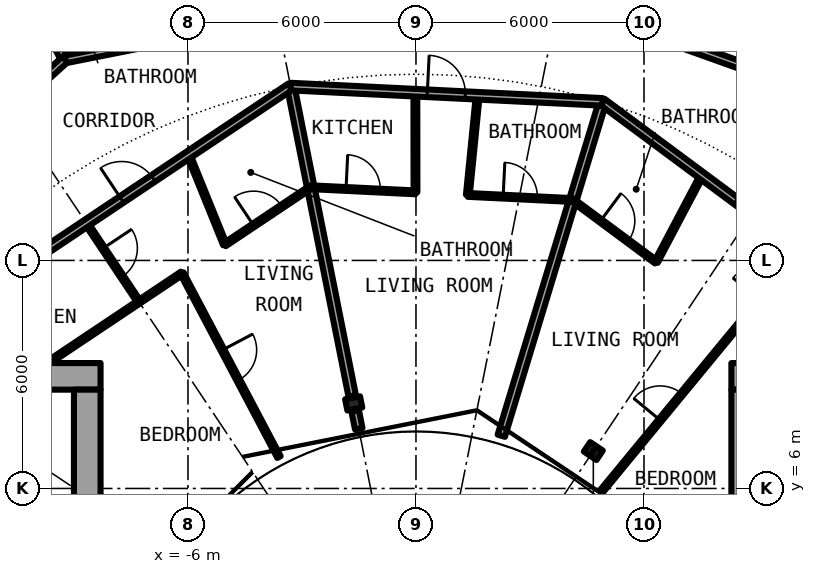
"""IFC4 building model, lengths in metres.
Left out: names, types, materials, properties, quantities, classifications, styles, units other than length and angle.
Written with IfcOpenShell. Run it as: python <this file> out.ifc"""

import sys

from ifc_helpers import new_model, si_unit, direction, frame, frame_2d, origin, origin_2d, place, context, subcontext, project, spatial, rectangle, i_section, extrude, element, fill, save


model = new_model("IFC4")
c1 = context("Model", 3, precision=1e-05, world=origin(), true_north=direction((0.0, 1.0)))
c2 = subcontext(c1, "Body", "Model", "MODEL_VIEW")
j1 = project(units=[si_unit("LENGTHUNIT", "METRE"), si_unit("PLANEANGLEUNIT", "RADIAN")], contexts=[c1])
p1 = place(None, origin())
s1 = spatial("IfcSite", under=j1, at=p1, CompositionType="ELEMENT")
p2 = place(p1, origin())
s2 = spatial("IfcBuilding", under=s1, at=p2, CompositionType="ELEMENT")
p3 = place(p2, frame((0.0, 0.0, 63.6)))
s3 = spatial("IfcBuildingStorey", under=s2, at=p3, CompositionType="ELEMENT", Elevation=63.6)
for number, where, z_axis, x_axis in (
    (1, (4.667, 6.984, 0.0), (0.0, 0.0, 1.0), (0.556, 0.831, 0.0)),
    (2, (-1.639, 8.239, 0.0), (0.0, 0.0, 1.0), (-0.195, 0.981, 0.0)),
):
    element("IfcColumn", number, at=place(p3, frame(where, z_axis=z_axis, x_axis=x_axis)), inside=s3, PredefinedType="COLUMN", context=c2, shape_type="SweptSolid", body=[
        extrude(i_section(OverallWidth=0.3, OverallDepth=0.4, WebThickness=0.013, FlangeThickness=0.024, FilletRadius=0.027, at=origin_2d()), origin(), (0.0, 0.0, 1.0), 3.05),
    ])
p4 = place(p3, frame((22.3, 8.95, 0.0), z_axis=(0.0, 0.0, 1.0), x_axis=(-1.0, 0.0, 0.0)))
e3 = element("IfcWall", 3, at=p4, inside=s3, PredefinedType="SHEAR", context=c2, shape_type="SweptSolid", body=[
    extrude(rectangle(XDim=14.0, YDim=0.7, at=frame_2d((7.0, 0.0))), origin(), (0.0, 0.0, 1.0), 3.05),
])
p5 = place(p4, frame((1.225, 0.0, 0.0)))
e4 = element("IfcOpeningElement", 4, at=p5, cuts=e3, PredefinedType="OPENING", context=c2, shape_type="SweptSolid", body=[
    extrude(rectangle(XDim=1.2, YDim=2.3, at=frame_2d((0.6, 1.15))), frame((0.0, 0.36, 0.0), z_axis=(0.0, -1.0, 0.0), x_axis=(1.0, 0.0, 0.0)), (0.0, 0.0, 1.0), 0.72),
])
p6 = place(p3, frame((8.65, -8.6, 0.0), z_axis=(0.0, 0.0, 1.0), x_axis=(0.0, 1.0, 0.0)))
e5 = element("IfcWall", 5, at=p6, inside=s3, PredefinedType="SHEAR", context=c2, shape_type="SweptSolid", body=[
    extrude(rectangle(XDim=17.2, YDim=0.7, at=frame_2d((8.6, 0.0))), origin(), (0.0, 0.0, 1.0), 3.05),
])
p7 = place(p6, frame((7.4, 0.0, 0.1)))
e6 = element("IfcOpeningElement", 6, at=p7, cuts=e5, PredefinedType="OPENING", context=c2, shape_type="SweptSolid", body=[
    extrude(rectangle(XDim=2.4, YDim=2.2, at=frame_2d((1.2, 1.1))), frame((0.0, 0.36, 0.0), z_axis=(0.0, -1.0, 0.0), x_axis=(1.0, 0.0, 0.0)), (0.0, 0.0, 1.0), 0.72),
])
p8 = place(p3, frame((-8.3, 8.95, 0.0), z_axis=(0.0, 0.0, 1.0), x_axis=(-1.0, 0.0, 0.0)))
e7 = element("IfcWall", 7, at=p8, inside=s3, PredefinedType="SHEAR", context=c2, shape_type="SweptSolid", body=[
    extrude(rectangle(XDim=14.0, YDim=0.7, at=frame_2d((7.0, 0.0))), origin(), (0.0, 0.0, 1.0), 3.05),
])
p9 = place(p8, frame((11.575, 0.0, 0.0)))
e8 = element("IfcOpeningElement", 8, at=p9, cuts=e7, PredefinedType="OPENING", context=c2, shape_type="SweptSolid", body=[
    extrude(rectangle(XDim=1.2, YDim=2.3, at=frame_2d((0.6, 1.15))), frame((0.0, 0.36, 0.0), z_axis=(0.0, -1.0, 0.0), x_axis=(1.0, 0.0, 0.0)), (0.0, 0.0, 1.0), 0.72),
])
p10 = place(p3, frame((-8.65, 8.6, 0.0), z_axis=(0.0, 0.0, 1.0), x_axis=(0.0, -1.0, 0.0)))
e9 = element("IfcWall", 9, at=p10, inside=s3, PredefinedType="SHEAR", context=c2, shape_type="SweptSolid", body=[
    extrude(rectangle(XDim=17.2, YDim=0.7, at=frame_2d((8.6, 0.0))), origin(), (0.0, 0.0, 1.0), 3.05),
])
p11 = place(p10, frame((7.4, 0.0, 0.1)))
e10 = element("IfcOpeningElement", 10, at=p11, cuts=e9, PredefinedType="OPENING", context=c2, shape_type="SweptSolid", body=[
    extrude(rectangle(XDim=2.4, YDim=2.2, at=frame_2d((1.2, 1.1))), frame((0.0, 0.36, 0.0), z_axis=(0.0, -1.0, 0.0), x_axis=(1.0, 0.0, 0.0)), (0.0, 0.0, 1.0), 0.72),
])
p12 = place(p3, frame((-12.81, 23.966, 0.0), z_axis=(0.0, 0.0, 1.0), x_axis=(0.471439510802, -0.881898399848, 0.0)))
e11 = element("IfcWall", 11, at=p12, inside=s3, PredefinedType="PARTITIONING", context=c2, shape_type="SweptSolid", body=[
    extrude(rectangle(XDim=7.575, YDim=0.2, at=frame_2d((3.787, 0.0))), origin(), (0.0, 0.0, 1.0), 2.7),
])
p13 = place(p3, frame((-8.674, 12.982, 0.0), z_axis=(0.0, 0.0, 1.0), x_axis=(0.555355163998, -0.831613276602, 0.0)))
e12 = element("IfcWall", 12, at=p13, inside=s3, PredefinedType="PARTITIONING", context=c2, shape_type="SweptSolid", body=[
    extrude(rectangle(XDim=2.494, YDim=0.1, at=frame_2d((1.247, 0.0))), origin(), (0.0, 0.0, 1.0), 2.7),
])
p14 = place(p13, frame((0.797, 0.0, 0.0)))
e13 = element("IfcOpeningElement", 13, at=p14, cuts=e12, PredefinedType="OPENING", context=c2, shape_type="SweptSolid", body=[
    extrude(rectangle(XDim=0.9, YDim=2.3, at=frame_2d((0.45, 1.15))), frame((0.0, 0.06, 0.0), z_axis=(0.0, -1.0, 0.0), x_axis=(1.0, 0.0, 0.0)), (0.0, 0.0, 1.0), 0.12),
])
p15 = place(p3, frame((-6.159, 11.663, 0.0), z_axis=(0.0, 0.0, 1.0), x_axis=(0.466976820365, -0.884269556889, 0.0)))
e14 = element("IfcWall", 14, at=p15, inside=s3, PredefinedType="PARTITIONING", context=c2, shape_type="SweptSolid", body=[
    extrude(rectangle(XDim=5.469, YDim=0.1, at=frame_2d((2.735, 0.0))), origin(), (0.0, 0.0, 1.0), 2.7),
])
p16 = place(p15, frame((2.284, 0.0, 0.0)))
e15 = element("IfcOpeningElement", 15, at=p16, cuts=e14, PredefinedType="OPENING", context=c2, shape_type="SweptSolid", body=[
    extrude(rectangle(XDim=0.9, YDim=2.3, at=frame_2d((0.45, 1.15))), frame((0.0, 0.06, 0.0), z_axis=(0.0, -1.0, 0.0), x_axis=(1.0, 0.0, 0.0)), (0.0, 0.0, 1.0), 0.12),
])
p17 = place(p3, frame((-5.986, 14.779, 0.0), z_axis=(0.0, 0.0, 1.0), x_axis=(0.375649498413, -0.926761811008, 0.0)))
e16 = element("IfcWall", 16, at=p17, inside=s3, PredefinedType="PARTITIONING", context=c2, shape_type="SweptSolid", body=[
    extrude(rectangle(XDim=2.548, YDim=0.1, at=frame_2d((1.274, 0.0))), origin(), (0.0, 0.0, 1.0), 2.7),
])
p18 = place(p3, frame((-3.297, 16.575, 0.0), z_axis=(0.0, 0.0, 1.0), x_axis=(0.195092097924, -0.980784927152, 0.0)))
e17 = element("IfcWall", 17, at=p18, inside=s3, PredefinedType="PARTITIONING", context=c2, shape_type="SweptSolid", body=[
    extrude(rectangle(XDim=8.299, YDim=0.2, at=frame_2d((4.15, 0.0))), origin(), (0.0, 0.0, 1.0), 2.7),
])
p19 = place(p3, frame((-1.6, 8.042, 0.0), z_axis=(0.0, 0.0, 1.0), x_axis=(0.196116135138, -0.980580675691, 0.0)))
e18 = element("IfcWall", 18, at=p19, inside=s3, PredefinedType="PARTITIONING", context=c2, shape_type="SweptSolid", body=[
    extrude(rectangle(XDim=0.479, YDim=0.2, at=frame_2d((0.24, 0.0))), origin(), (0.0, 0.0, 1.0), 2.7),
])
p20 = place(p3, frame((-0.013, 13.792, 0.0), z_axis=(0.0, 0.0, 1.0), x_axis=(-0.001210427419, 0.999999267432, 0.0)))
e19 = element("IfcWall", 19, at=p20, inside=s3, PredefinedType="PARTITIONING", context=c2, shape_type="SweptSolid", body=[
    extrude(rectangle(XDim=2.622, YDim=0.1, at=frame_2d((1.311, 0.0))), origin(), (0.0, 0.0, 1.0), 2.7),
])
p21 = place(p3, frame((1.365, 13.724, 0.0), z_axis=(0.0, 0.0, 1.0), x_axis=(0.099171803948, 0.995070325807, 0.0)))
e20 = element("IfcWall", 20, at=p21, inside=s3, PredefinedType="PARTITIONING", context=c2, shape_type="SweptSolid", body=[
    extrude(rectangle(XDim=2.622, YDim=0.1, at=frame_2d((1.311, 0.0))), origin(), (0.0, 0.0, 1.0), 2.7),
])
p22 = place(p3, frame((2.245, 7.387, 0.0), z_axis=(0.0, 0.0, 1.0), x_axis=(0.290403763195, 0.956904203315, 0.0)))
e21 = element("IfcWall", 21, at=p22, inside=s3, PredefinedType="PARTITIONING", context=c2, shape_type="SweptSolid", body=[
    extrude(rectangle(XDim=9.179, YDim=0.2, at=frame_2d((4.59, 0.0))), origin(), (0.0, 0.0, 1.0), 2.7),
])
p23 = place(p3, frame((4.909, 5.958, 0.0), z_axis=(0.0, 0.0, 1.0), x_axis=(0.635976043025, 0.771708800454, 0.0)))
e22 = element("IfcWall", 22, at=p23, inside=s3, PredefinedType="PARTITIONING", context=c2, shape_type="SweptSolid", body=[
    extrude(rectangle(XDim=8.213, YDim=0.1, at=frame_2d((4.106, 0.0))), origin(), (0.0, 0.0, 1.0), 2.7),
])
p24 = place(p23, frame((6.49, 0.0, 0.0)))
e23 = element("IfcOpeningElement", 23, at=p24, cuts=e22, PredefinedType="OPENING", context=c2, shape_type="SweptSolid", body=[
    extrude(rectangle(XDim=0.9, YDim=2.3, at=frame_2d((0.45, 1.15))), frame((0.0, 0.06, 0.0), z_axis=(0.0, -1.0, 0.0), x_axis=(1.0, 0.0, 0.0)), (0.0, 0.0, 1.0), 0.12),
])
p25 = place(p23, frame((2.384, 0.0, 0.0)))
e24 = element("IfcOpeningElement", 24, at=p25, cuts=e22, PredefinedType="OPENING", context=c2, shape_type="SweptSolid", body=[
    extrude(rectangle(XDim=0.9, YDim=2.3, at=frame_2d((0.45, 1.15))), frame((0.0, 0.06, 0.0), z_axis=(0.0, -1.0, 0.0), x_axis=(1.0, 0.0, 0.0)), (0.0, 0.0, 1.0), 0.12),
])
p26 = place(p3, frame((6.318, 11.96, 0.0), z_axis=(0.0, 0.0, 1.0), x_axis=(0.467001992543, 0.884256263173, 0.0)))
e25 = element("IfcWall", 25, at=p26, inside=s3, PredefinedType="PARTITIONING", context=c2, shape_type="SweptSolid", body=[
    extrude(rectangle(XDim=2.572, YDim=0.1, at=frame_2d((1.286, 0.0))), origin(), (0.0, 0.0, 1.0), 2.7),
])
p27 = place(p3, frame((-9.695, 9.3, 0.0), z_axis=(0.0, 0.0, 1.0), x_axis=(0.831369521678, 0.555720000022, 0.0)))
e26 = element("IfcWall", 26, at=p27, inside=s3, PredefinedType="PARTITIONING", context=c2, shape_type="SweptSolid", body=[
    extrude(rectangle(XDim=4.252, YDim=0.1, at=frame_2d((2.126, 0.0))), origin(), (0.0, 0.0, 1.0), 2.7),
])
p28 = place(p3, frame((-5.032, 12.417, 0.0), z_axis=(0.0, 0.0, 1.0), x_axis=(0.831538390496, 0.555467285384, 0.0)))
e27 = element("IfcWall", 27, at=p28, inside=s3, PredefinedType="PARTITIONING", context=c2, shape_type="SweptSolid", body=[
    extrude(rectangle(XDim=2.717, YDim=0.1, at=frame_2d((1.358, 0.0))), origin(), (0.0, 0.0, 1.0), 2.7),
])
p29 = place(p28, frame((0.911, 0.0, 0.0)))
e28 = element("IfcOpeningElement", 28, at=p29, cuts=e27, PredefinedType="OPENING", context=c2, shape_type="SweptSolid", body=[
    extrude(rectangle(XDim=0.9, YDim=2.3, at=frame_2d((0.45, 1.15))), frame((0.0, 0.06, 0.0), z_axis=(0.0, -1.0, 0.0), x_axis=(1.0, 0.0, 0.0)), (0.0, 0.0, 1.0), 0.12),
])
p30 = place(p3, frame((4.122, 13.589, 0.0), z_axis=(0.0, 0.0, 1.0), x_axis=(0.803128348509, -0.595806055542, 0.0)))
e29 = element("IfcWall", 29, at=p30, inside=s3, PredefinedType="PARTITIONING", context=c2, shape_type="SweptSolid", body=[
    extrude(rectangle(XDim=2.734, YDim=0.1, at=frame_2d((1.367, 0.0))), origin(), (0.0, 0.0, 1.0), 2.7),
])
p31 = place(p30, frame((0.917, 0.0, 0.0)))
e30 = element("IfcOpeningElement", 30, at=p31, cuts=e29, PredefinedType="OPENING", context=c2, shape_type="SweptSolid", body=[
    extrude(rectangle(XDim=0.9, YDim=2.3, at=frame_2d((0.45, 1.15))), frame((0.0, 0.06, 0.0), z_axis=(0.0, -1.0, 0.0), x_axis=(1.0, 0.0, 0.0)), (0.0, 0.0, 1.0), 0.12),
])
p32 = place(p3, frame((-2.77, 13.926, 0.0), z_axis=(0.0, 0.0, 1.0), x_axis=(0.99880320044, -0.048909782152, 0.0)))
e31 = element("IfcWall", 31, at=p32, inside=s3, PredefinedType="PARTITIONING", context=c2, shape_type="SweptSolid", body=[
    extrude(rectangle(XDim=2.76, YDim=0.1, at=frame_2d((1.38, 0.0))), origin(), (0.0, 0.0, 1.0), 2.7),
])
p33 = place(p32, frame((0.93, 0.0, 0.0)))
e32 = element("IfcOpeningElement", 32, at=p33, cuts=e31, PredefinedType="OPENING", context=c2, shape_type="SweptSolid", body=[
    extrude(rectangle(XDim=0.9, YDim=2.3, at=frame_2d((0.45, 1.15))), frame((0.0, 0.06, 0.0), z_axis=(0.0, -1.0, 0.0), x_axis=(1.0, 0.0, 0.0)), (0.0, 0.0, 1.0), 0.12),
])
p34 = place(p3, frame((1.365, 13.724, 0.0), z_axis=(0.0, 0.0, 1.0), x_axis=(0.99880320044, -0.048909782152, 0.0)))
e33 = element("IfcWall", 33, at=p34, inside=s3, PredefinedType="PARTITIONING", context=c2, shape_type="SweptSolid", body=[
    extrude(rectangle(XDim=2.76, YDim=0.1, at=frame_2d((1.38, 0.0))), origin(), (0.0, 0.0, 1.0), 2.7),
])
p35 = place(p34, frame((0.93, 0.0, 0.0)))
e34 = element("IfcOpeningElement", 34, at=p35, cuts=e33, PredefinedType="OPENING", context=c2, shape_type="SweptSolid", body=[
    extrude(rectangle(XDim=0.9, YDim=2.3, at=frame_2d((0.45, 1.15))), frame((0.0, 0.06, 0.0), z_axis=(0.0, -1.0, 0.0), x_axis=(1.0, 0.0, 0.0)), (0.0, 0.0, 1.0), 0.12),
])
p36 = place(p3, frame((-12.708, 10.286, 0.0), z_axis=(0.0, 0.0, 1.0), x_axis=(0.831405725802, 0.555665834026, 0.0)))
e35 = element("IfcWall", 35, at=p36, inside=s3, PredefinedType="PARTITIONING", context=c2, shape_type="SweptSolid", body=[
    extrude(rectangle(XDim=11.314, YDim=0.2, at=frame_2d((5.657, 0.0))), origin(), (0.0, 0.0, 1.0), 2.7),
])
p37 = place(p36, frame((5.969, 0.0, 0.0)))
e36 = element("IfcOpeningElement", 36, at=p37, cuts=e35, PredefinedType="OPENING", context=c2, shape_type="SweptSolid", body=[
    extrude(rectangle(XDim=1.0, YDim=2.3, at=frame_2d((0.5, 1.15))), frame((0.0, 0.11, 0.0), z_axis=(0.0, -1.0, 0.0), x_axis=(1.0, 0.0, 0.0)), (0.0, 0.0, 1.0), 0.22),
])
p38 = place(p3, frame((4.906, 16.172, 0.0), z_axis=(0.0, 0.0, 1.0), x_axis=(0.803191461888, -0.595720971219, 0.0)))
e37 = element("IfcWall", 37, at=p38, inside=s3, PredefinedType="PARTITIONING", context=c2, shape_type="SweptSolid", body=[
    extrude(rectangle(XDim=9.76, YDim=0.2, at=frame_2d((4.88, 0.0))), origin(), (0.0, 0.0, 1.0), 2.7),
])
p39 = place(p38, frame((4.38, 0.0, 0.0)))
e38 = element("IfcOpeningElement", 38, at=p39, cuts=e37, PredefinedType="OPENING", context=c2, shape_type="SweptSolid", body=[
    extrude(rectangle(XDim=1.0, YDim=2.3, at=frame_2d((0.5, 1.15))), frame((0.0, 0.11, 0.0), z_axis=(0.0, -1.0, 0.0), x_axis=(1.0, 0.0, 0.0)), (0.0, 0.0, 1.0), 0.22),
])
p40 = place(p3, frame((-3.298, 16.574, 0.0), z_axis=(0.0, 0.0, 1.0), x_axis=(0.998802523271, -0.048923608895, 0.0)))
e39 = element("IfcWall", 39, at=p40, inside=s3, PredefinedType="PARTITIONING", context=c2, shape_type="SweptSolid", body=[
    extrude(rectangle(XDim=8.214, YDim=0.2, at=frame_2d((4.107, 0.0))), origin(), (0.0, 0.0, 1.0), 2.7),
])
p41 = place(p40, frame((3.6, 0.0, 0.0)))
e40 = element("IfcOpeningElement", 40, at=p41, cuts=e39, PredefinedType="OPENING", context=c2, shape_type="SweptSolid", body=[
    extrude(rectangle(XDim=1.0, YDim=2.3, at=frame_2d((0.5, 1.15))), frame((0.0, 0.11, 0.0), z_axis=(0.0, -1.0, 0.0), x_axis=(1.0, 0.0, 0.0)), (0.0, 0.0, 1.0), 0.22),
])
p42 = place(p3, frame((-9.239, 17.286, 0.0), z_axis=(0.0, 0.0, 1.0), x_axis=(0.98077905287, 0.195121627328, 0.0)))
e41 = element("IfcWall", 41, at=p42, inside=s3, PredefinedType="PARTITIONING", context=c2, shape_type="SweptSolid", body=[
    extrude(rectangle(XDim=11.379, YDim=0.2, at=frame_2d((5.689, 0.0))), origin(), (0.0, 0.0, 1.0), 2.38),
])
p43 = place(p42, frame((4.241, 0.0, 0.0)))
e42 = element("IfcOpeningElement", 42, at=p43, cuts=e41, PredefinedType="OPENING", context=c2, shape_type="SweptSolid", body=[
    extrude(rectangle(XDim=1.0, YDim=2.3, at=frame_2d((0.5, 1.15))), frame((0.0, 0.11, 0.0), z_axis=(0.0, -1.0, 0.0), x_axis=(1.0, 0.0, 0.0)), (0.0, 0.0, 1.0), 0.22),
])
p44 = place(p3, frame((-16.18, 10.995, 0.0), z_axis=(0.0, 0.0, 1.0), x_axis=(0.741086986457, 0.671409024741, 0.0)))
e43 = element("IfcWall", 43, at=p44, inside=s3, PredefinedType="PARTITIONING", context=c2, shape_type="SweptSolid", body=[
    extrude(rectangle(XDim=9.373, YDim=0.2, at=frame_2d((4.687, 0.0))), origin(), (0.0, 0.0, 1.0), 2.38),
])
p45 = place(p44, frame((4.115, 0.0, 0.0)))
e44 = element("IfcOpeningElement", 44, at=p45, cuts=e43, PredefinedType="OPENING", context=c2, shape_type="SweptSolid", body=[
    extrude(rectangle(XDim=1.0, YDim=2.3, at=frame_2d((0.5, 1.15))), frame((0.0, 0.11, 0.0), z_axis=(0.0, -1.0, 0.0), x_axis=(1.0, 0.0, 0.0)), (0.0, 0.0, 1.0), 0.22),
])
p46 = place(p3, frame((1.924, 19.505, 0.0), z_axis=(0.0, 0.0, 1.0), x_axis=(0.941497449807, -0.337020106237, 0.0)))
e45 = element("IfcWall", 45, at=p46, inside=s3, PredefinedType="PARTITIONING", context=c2, shape_type="SweptSolid", body=[
    extrude(rectangle(XDim=9.364, YDim=0.2, at=frame_2d((4.682, 0.0))), origin(), (0.0, 0.0, 1.0), 2.38),
])
p47 = place(p46, frame((4.259, 0.0, 0.0)))
e46 = element("IfcOpeningElement", 46, at=p47, cuts=e45, PredefinedType="OPENING", context=c2, shape_type="SweptSolid", body=[
    extrude(rectangle(XDim=1.0, YDim=2.3, at=frame_2d((0.5, 1.15))), frame((0.0, 0.11, 0.0), z_axis=(0.0, -1.0, 0.0), x_axis=(1.0, 0.0, 0.0)), (0.0, 0.0, 1.0), 0.22),
])
p48 = place(p39, origin())
e47 = element("IfcDoor", 47, at=p48, inside=s3, OperationType="SINGLE_SWING_LEFT", PredefinedType="DOOR", context=c2, shape_type="SweptSolid", body=[
    extrude(rectangle(XDim=1.0, YDim=2.3, at=frame_2d((0.5, 1.15))), frame((0.0, 0.025, 0.0), z_axis=(0.0, -1.0, 0.0), x_axis=(1.0, 0.0, 0.0)), (0.0, 0.0, 1.0), 0.05),
])
fill(e38, e47)
p49 = place(p31, origin())
e48 = element("IfcDoor", 48, at=p49, inside=s3, OperationType="SINGLE_SWING_LEFT", PredefinedType="DOOR", context=c2, shape_type="SweptSolid", body=[
    extrude(rectangle(XDim=0.9, YDim=2.3, at=frame_2d((0.45, 1.15))), frame((0.0, 0.025, 0.0), z_axis=(0.0, -1.0, 0.0), x_axis=(1.0, 0.0, 0.0)), (0.0, 0.0, 1.0), 0.05),
])
fill(e30, e48)
p50 = place(p25, origin())
e49 = element("IfcDoor", 49, at=p50, inside=s3, OperationType="SINGLE_SWING_LEFT", PredefinedType="DOOR", context=c2, shape_type="SweptSolid", body=[
    extrude(rectangle(XDim=0.9, YDim=2.3, at=frame_2d((0.45, 1.15))), frame((0.0, 0.025, 0.0), z_axis=(0.0, -1.0, 0.0), x_axis=(1.0, 0.0, 0.0)), (0.0, 0.0, 1.0), 0.05),
])
fill(e24, e49)
p51 = place(p41, origin())
e50 = element("IfcDoor", 50, at=p51, inside=s3, OperationType="SINGLE_SWING_LEFT", PredefinedType="DOOR", context=c2, shape_type="SweptSolid", body=[
    extrude(rectangle(XDim=1.0, YDim=2.3, at=frame_2d((0.5, 1.15))), frame((0.0, 0.025, 0.0), z_axis=(0.0, -1.0, 0.0), x_axis=(1.0, 0.0, 0.0)), (0.0, 0.0, 1.0), 0.05),
])
fill(e40, e50)
p52 = place(p35, origin())
e51 = element("IfcDoor", 51, at=p52, inside=s3, OperationType="SINGLE_SWING_LEFT", PredefinedType="DOOR", context=c2, shape_type="SweptSolid", body=[
    extrude(rectangle(XDim=0.9, YDim=2.3, at=frame_2d((0.45, 1.15))), frame((0.0, 0.025, 0.0), z_axis=(0.0, -1.0, 0.0), x_axis=(1.0, 0.0, 0.0)), (0.0, 0.0, 1.0), 0.05),
])
fill(e34, e51)
p53 = place(p33, origin())
e52 = element("IfcDoor", 52, at=p53, inside=s3, OperationType="SINGLE_SWING_LEFT", PredefinedType="DOOR", context=c2, shape_type="SweptSolid", body=[
    extrude(rectangle(XDim=0.9, YDim=2.3, at=frame_2d((0.45, 1.15))), frame((0.0, 0.025, 0.0), z_axis=(0.0, -1.0, 0.0), x_axis=(1.0, 0.0, 0.0)), (0.0, 0.0, 1.0), 0.05),
])
fill(e32, e52)
p54 = place(p37, origin())
e53 = element("IfcDoor", 53, at=p54, inside=s3, OperationType="SINGLE_SWING_RIGHT", PredefinedType="DOOR", context=c2, shape_type="SweptSolid", body=[
    extrude(rectangle(XDim=1.0, YDim=2.3, at=frame_2d((0.5, 1.15))), frame((0.0, 0.025, 0.0), z_axis=(0.0, -1.0, 0.0), x_axis=(1.0, 0.0, 0.0)), (0.0, 0.0, 1.0), 0.05),
])
fill(e36, e53)
p55 = place(p29, origin())
e54 = element("IfcDoor", 54, at=p55, inside=s3, OperationType="SINGLE_SWING_RIGHT", PredefinedType="DOOR", context=c2, shape_type="SweptSolid", body=[
    extrude(rectangle(XDim=0.9, YDim=2.3, at=frame_2d((0.45, 1.15))), frame((0.0, 0.025, 0.0), z_axis=(0.0, -1.0, 0.0), x_axis=(1.0, 0.0, 0.0)), (0.0, 0.0, 1.0), 0.05),
])
fill(e28, e54)
p56 = place(p14, origin())
e55 = element("IfcDoor", 55, at=p56, inside=s3, OperationType="SINGLE_SWING_RIGHT", PredefinedType="DOOR", context=c2, shape_type="SweptSolid", body=[
    extrude(rectangle(XDim=0.9, YDim=2.3, at=frame_2d((0.45, 1.15))), frame((0.0, 0.025, 0.0), z_axis=(0.0, -1.0, 0.0), x_axis=(1.0, 0.0, 0.0)), (0.0, 0.0, 1.0), 0.05),
])
fill(e13, e55)
p57 = place(p16, origin())
e56 = element("IfcDoor", 56, at=p57, inside=s3, OperationType="SINGLE_SWING_RIGHT", PredefinedType="DOOR", context=c2, shape_type="SweptSolid", body=[
    extrude(rectangle(XDim=0.9, YDim=2.3, at=frame_2d((0.45, 1.15))), frame((0.0, 0.025, 0.0), z_axis=(0.0, -1.0, 0.0), x_axis=(1.0, 0.0, 0.0)), (0.0, 0.0, 1.0), 0.05),
])
fill(e15, e56)
save(model, sys.argv[1])
